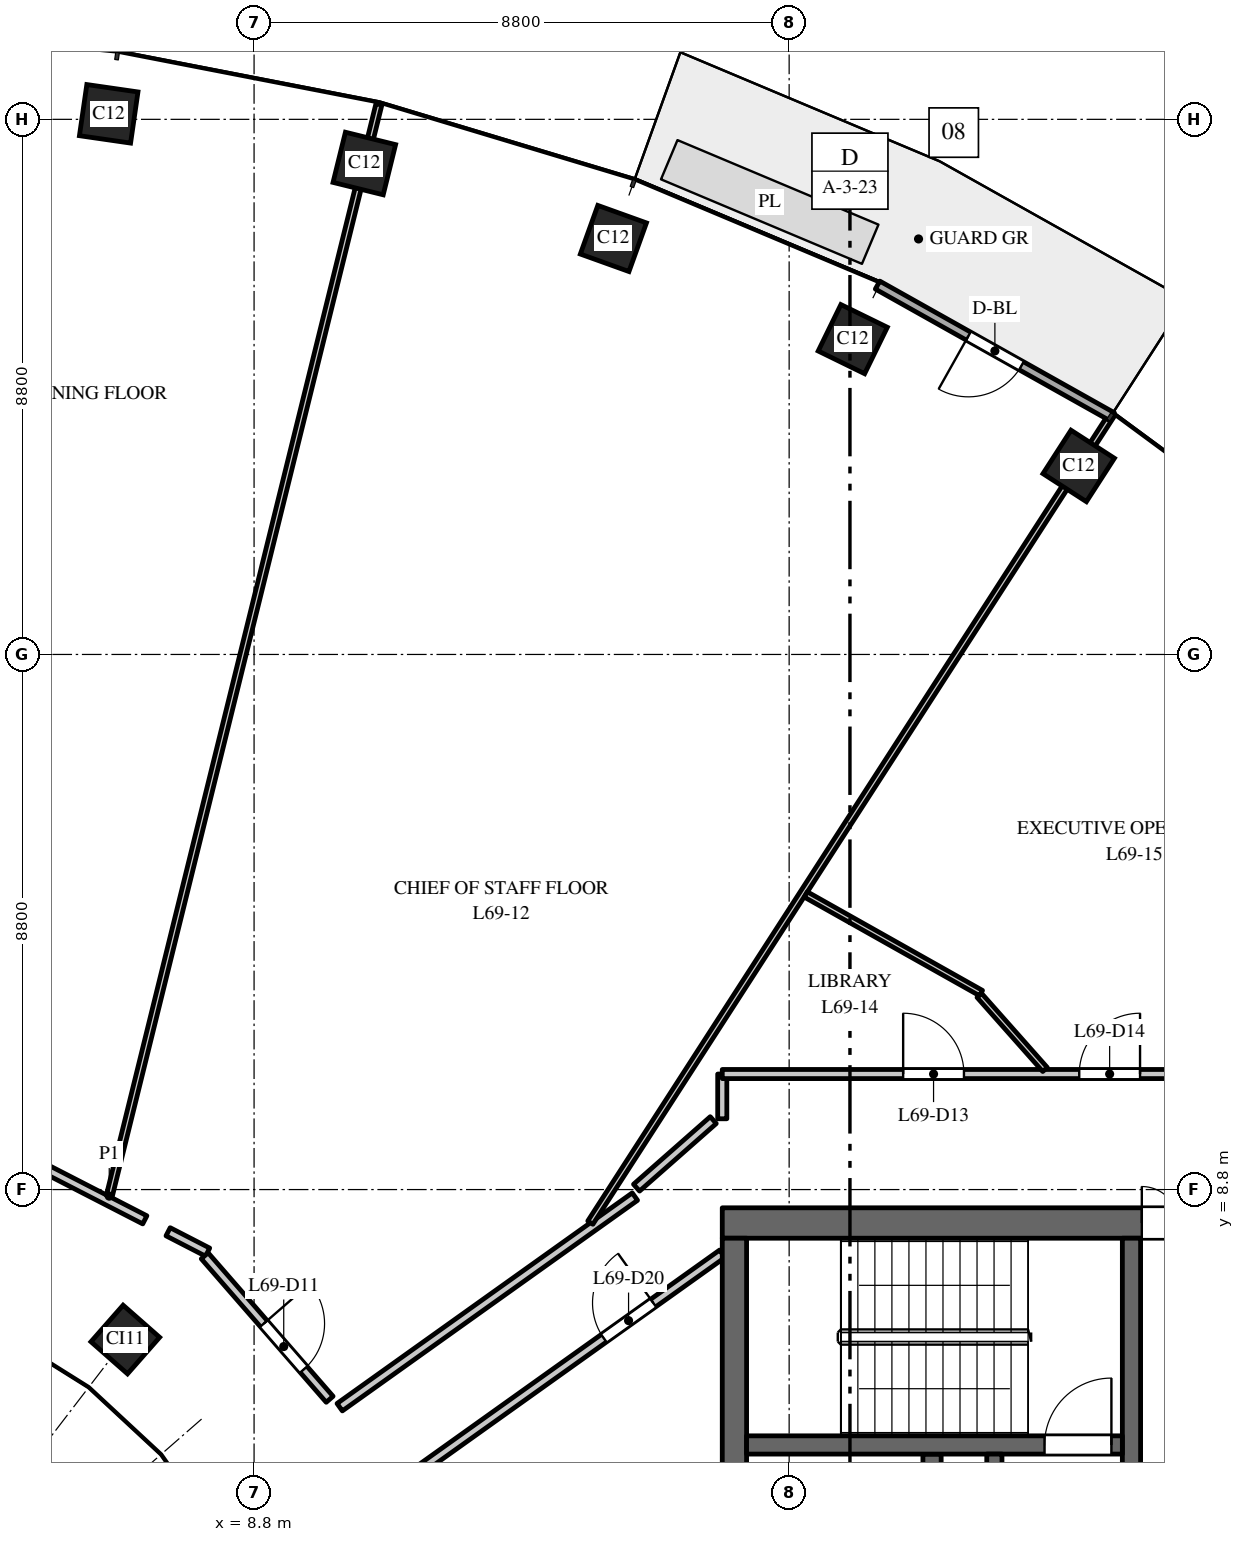
"""IFC4 building model, lengths in metres.
Left out: names, types, materials, properties, quantities, classifications, styles, units other than length and angle.
Written with IfcOpenShell. Run it as: python <this file> out.ifc"""

import sys

from ifc_helpers import new_model, si_unit, direction, frame, frame_2d, origin, origin_2d, place, context, subcontext, project, spatial, rectangle, extrude, element, fill, save


model = new_model("IFC4")
c1 = context("Model", 3, precision=1e-05, world=origin(), true_north=direction((0.0, 1.0)))
c2 = subcontext(c1, "Body", "Model", "MODEL_VIEW")
j1 = project(units=[si_unit("LENGTHUNIT", "METRE"), si_unit("PLANEANGLEUNIT", "RADIAN")], contexts=[c1])
p1 = place(None, origin())
s1 = spatial("IfcSite", under=j1, at=p1, CompositionType="ELEMENT")
p2 = place(p1, origin())
s2 = spatial("IfcBuilding", under=s1, at=p2, CompositionType="ELEMENT")
p3 = place(p2, frame((0.0, 0.0, 319.0)))
s3 = spatial("IfcBuildingStorey", under=s2, at=p3, CompositionType="ELEMENT", Elevation=319.0)
for number, where, z_axis, x_axis in (
    (1, (22.362, 20.7, 0.0), (0.0, 0.0, 1.0), (-0.84, 0.542, 0.0)),
    (2, (18.646, 22.785, 0.0), (0.0, 0.0, 1.0), (-0.898, 0.439, 0.0)),
    (3, (14.709, 24.441, 0.0), (0.0, 0.0, 1.0), (-0.941, 0.338, 0.0)),
    (4, (10.613, 25.674, 0.0), (0.0, 0.0, 1.0), (-0.971, 0.24, 0.0)),
    (5, (6.409, 26.491, 0.0), (0.0, 0.0, 1.0), (-0.99, 0.143, 0.0)),
):
    element("IfcColumn", number, at=place(p3, frame(where, z_axis=z_axis, x_axis=x_axis)), inside=s3, PredefinedType="COLUMN", context=c2, shape_type="SweptSolid", body=[
        extrude(rectangle(XDim=0.85, YDim=0.85, at=origin_2d()), origin(), (0.0, 0.0, 1.0), 4.0),
    ])
p4 = place(p3, frame((6.682, 6.334, 0.0), z_axis=(0.0, 0.0, 1.0), x_axis=(-0.75102249095, 0.660276622399, 0.0)))
e6 = element("IfcColumn", 6, at=p4, inside=s3, PredefinedType="COLUMN", context=c2, shape_type="SweptSolid", body=[
    extrude(rectangle(XDim=0.8, YDim=0.8, at=origin_2d()), origin(), (0.0, 0.0, 1.0), 4.0),
])
p5 = place(p3, frame((16.5, 8.25, 0.0), z_axis=(0.0, 0.0, 1.0), x_axis=(1.0, 0.0, 0.0)))
e7 = element("IfcWall", 7, at=p5, inside=s3, PredefinedType="SHEAR", context=c2, shape_type="SweptSolid", body=[
    extrude(rectangle(XDim=15.0, YDim=0.5, at=frame_2d((7.5, 0.0))), origin(), (0.0, 0.0, 1.0), 3.7),
])
p6 = place(p5, frame((6.9, 0.0, 0.0)))
e8 = element("IfcOpeningElement", 8, at=p6, cuts=e7, PredefinedType="OPENING", context=c2, shape_type="SweptSolid", body=[
    extrude(rectangle(XDim=1.2, YDim=2.1, at=frame_2d((0.6, 1.05))), frame((0.0, 0.26, 0.0), z_axis=(0.0, -1.0, 0.0), x_axis=(1.0, 0.0, 0.0)), (0.0, 0.0, 1.0), 0.52),
])
p7 = place(p5, frame((12.05, 0.0, 0.0)))
e9 = element("IfcOpeningElement", 9, at=p7, cuts=e7, PredefinedType="OPENING", context=c2, shape_type="SweptSolid", body=[
    extrude(rectangle(XDim=0.9, YDim=2.1, at=frame_2d((0.45, 1.05))), frame((0.0, 0.26, 0.0), z_axis=(0.0, -1.0, 0.0), x_axis=(1.0, 0.0, 0.0)), (0.0, 0.0, 1.0), 0.52),
])
p8 = place(p3, frame((19.95, -4.45, 0.0), z_axis=(0.0, 0.0, 1.0), x_axis=(0.0, 1.0, 0.0)))
e10 = element("IfcWall", 10, at=p8, inside=s3, PredefinedType="SHEAR", context=c2, shape_type="SweptSolid", body=[
    extrude(rectangle(XDim=8.9, YDim=0.3, at=frame_2d((4.45, 0.0))), origin(), (0.0, 0.0, 1.0), 3.7),
])
p9 = place(p8, frame((0.775, 0.0, 0.0)))
e11 = element("IfcOpeningElement", 11, at=p9, cuts=e10, PredefinedType="OPENING", context=c2, shape_type="SweptSolid", body=[
    extrude(rectangle(XDim=1.2, YDim=2.1, at=frame_2d((0.6, 1.05))), frame((0.0, 0.16, 0.0), z_axis=(0.0, -1.0, 0.0), x_axis=(1.0, 0.0, 0.0)), (0.0, 0.0, 1.0), 0.32),
])
p10 = place(p8, frame((6.0, 0.0, 0.0)))
e12 = element("IfcOpeningElement", 12, at=p10, cuts=e10, PredefinedType="OPENING", context=c2, shape_type="SweptSolid", body=[
    extrude(rectangle(XDim=0.9, YDim=2.1, at=frame_2d((0.45, 1.05))), frame((0.0, 0.16, 0.0), z_axis=(0.0, -1.0, 0.0), x_axis=(1.0, 0.0, 0.0)), (0.0, 0.0, 1.0), 0.32),
])
p11 = place(p3, frame((16.7, -8.0, 0.0), z_axis=(0.0, 0.0, 1.0), x_axis=(0.0, 1.0, 0.0)))
e13 = element("IfcWall", 13, at=p11, inside=s3, PredefinedType="SHEAR", context=c2, shape_type="SweptSolid", body=[
    extrude(rectangle(XDim=16.0, YDim=0.4, at=frame_2d((8.0, 0.0))), origin(), (0.0, 0.0, 1.0), 3.7),
])
p12 = place(p3, frame((23.23, 2.25, 0.0), z_axis=(0.0, 0.0, 1.0), x_axis=(0.0, 1.0, 0.0)))
e14 = element("IfcWall", 14, at=p12, inside=s3, PredefinedType="SHEAR", context=c2, shape_type="SweptSolid", body=[
    extrude(rectangle(XDim=5.75, YDim=0.3, at=frame_2d((2.875, 0.0))), origin(), (0.0, 0.0, 1.0), 3.7),
])
p13 = place(p12, frame((0.6, 0.0, 0.0)))
e15 = element("IfcOpeningElement", 15, at=p13, cuts=e14, PredefinedType="OPENING", context=c2, shape_type="SweptSolid", body=[
    extrude(rectangle(XDim=1.0, YDim=2.1, at=frame_2d((0.5, 1.05))), frame((0.0, 0.16, 0.0), z_axis=(0.0, -1.0, 0.0), x_axis=(1.0, 0.0, 0.0)), (0.0, 0.0, 1.0), 0.32),
])
p14 = place(p3, frame((16.9, 4.6, 0.0), z_axis=(0.0, 0.0, 1.0), x_axis=(1.0, 0.0, 0.0)))
e16 = element("IfcWall", 16, at=p14, inside=s3, PredefinedType="SHEAR", context=c2, shape_type="SweptSolid", body=[
    extrude(rectangle(XDim=6.18, YDim=0.3, at=frame_2d((3.09, 0.0))), origin(), (0.0, 0.0, 1.0), 3.7),
])
p15 = place(p14, frame((4.9, 0.0, 0.0)))
e17 = element("IfcOpeningElement", 17, at=p15, cuts=e16, PredefinedType="OPENING", context=c2, shape_type="SweptSolid", body=[
    extrude(rectangle(XDim=1.1, YDim=2.1, at=frame_2d((0.55, 1.05))), frame((0.0, 0.16, 0.0), z_axis=(0.0, -1.0, 0.0), x_axis=(1.0, 0.0, 0.0)), (0.0, 0.0, 1.0), 0.32),
])
p16 = place(p3, frame((20.975, 2.25, 0.0), z_axis=(0.0, 0.0, 1.0), x_axis=(0.0, 1.0, 0.0)))
e18 = element("IfcWall", 18, at=p16, inside=s3, PredefinedType="SHEAR", context=c2, shape_type="SweptSolid", body=[
    extrude(rectangle(XDim=2.2, YDim=0.25, at=frame_2d((1.1, 0.0))), origin(), (0.0, 0.0, 1.0), 3.7),
])
p17 = place(p3, frame((22.913, 21.509, 0.0), z_axis=(0.0, 0.0, 1.0), x_axis=(-0.872046572975, 0.489422899509, 0.0)))
e19 = element("IfcWall", 19, at=p17, inside=s3, PredefinedType="STANDARD", context=c2, shape_type="SweptSolid", body=[
    extrude(rectangle(XDim=4.426, YDim=0.15, at=frame_2d((2.213, 0.0))), origin(), (0.0, 0.0, 1.0), 3.7),
])
p18 = place(p17, frame((1.713, 0.0, 0.0)))
e20 = element("IfcOpeningElement", 20, at=p18, cuts=e19, PredefinedType="OPENING", context=c2, shape_type="SweptSolid", body=[
    extrude(rectangle(XDim=1.0, YDim=2.4, at=frame_2d((0.5, 1.2))), frame((0.0, 0.085, 0.0), z_axis=(0.0, -1.0, 0.0), x_axis=(1.0, 0.0, 0.0)), (0.0, 0.0, 1.0), 0.17),
])
p19 = place(p3, frame((4.276, 9.704, 0.0), z_axis=(0.0, 0.0, 1.0), x_axis=(0.889338682752, -0.45724906491, 0.0)))
e21 = element("IfcWall", 21, at=p19, inside=s3, PredefinedType="PARTITIONING", context=c2, shape_type="SweptSolid", body=[
    extrude(rectangle(XDim=3.066, YDim=0.15, at=frame_2d((1.533, 0.0))), origin(), (0.0, 0.0, 1.0), 2.85),
])
p20 = place(p3, frame((6.418, 8.692, 0.0), z_axis=(0.0, 0.0, 1.0), x_axis=(0.239813663249, 0.970818936218, 0.0)))
e22 = element("IfcWall", 22, at=p20, inside=s3, PredefinedType="PARTITIONING", context=c2, shape_type="SweptSolid", body=[
    extrude(rectangle(XDim=18.494, YDim=0.1, at=frame_2d((9.247, 0.0))), origin(), (0.0, 0.0, 1.0), 2.85),
])
p21 = place(p3, frame((7.386, 8.106, 0.0), z_axis=(0.0, 0.0, 1.0), x_axis=(0.888883911649, -0.458132504426, 0.0)))
e23 = element("IfcWall", 23, at=p21, inside=s3, PredefinedType="PARTITIONING", context=c2, shape_type="SweptSolid", body=[
    extrude(rectangle(XDim=0.731, YDim=0.15, at=frame_2d((0.366, 0.0))), origin(), (0.0, 0.0, 1.0), 3.7),
])
p22 = place(p3, frame((7.988, 7.711, 0.0), z_axis=(0.0, 0.0, 1.0), x_axis=(0.656702027819, -0.754150148616, 0.0)))
e24 = element("IfcWall", 24, at=p22, inside=s3, PredefinedType="PARTITIONING", context=c2, shape_type="SweptSolid", body=[
    extrude(rectangle(XDim=3.129, YDim=0.15, at=frame_2d((1.564, 0.0))), origin(), (0.0, 0.0, 1.0), 2.75),
])
p23 = place(p22, frame((1.479, 0.0, 0.0)))
e25 = element("IfcOpeningElement", 25, at=p23, cuts=e24, PredefinedType="OPENING", context=c2, shape_type="SweptSolid", body=[
    extrude(rectangle(XDim=1.0, YDim=2.1, at=frame_2d((0.5, 1.05))), frame((0.0, 0.085, 0.0), z_axis=(0.0, -1.0, 0.0), x_axis=(1.0, 0.0, 0.0)), (0.0, 0.0, 1.0), 0.17),
])
p24 = place(p3, frame((10.208, 5.221, 0.0), z_axis=(0.0, 0.0, 1.0), x_axis=(0.814106730479, 0.580715275663, 0.0)))
e26 = element("IfcWall", 26, at=p24, inside=s3, PredefinedType="PARTITIONING", context=c2, shape_type="SweptSolid", body=[
    extrude(rectangle(XDim=5.964, YDim=0.15, at=frame_2d((2.982, 0.0))), origin(), (0.0, 0.0, 1.0), 2.75),
])
p25 = place(p3, frame((10.97, 3.799, 0.0), z_axis=(0.0, 0.0, 1.0), x_axis=(0.814095150002, 0.580731510032, 0.0)))
e27 = element("IfcWall", 27, at=p25, inside=s3, PredefinedType="PARTITIONING", context=c2, shape_type="SweptSolid", body=[
    extrude(rectangle(XDim=6.793, YDim=0.15, at=frame_2d((3.396, 0.0))), origin(), (0.0, 0.0, 1.0), 3.7),
])
p26 = place(p25, frame((4.4, 0.0, 0.0)))
e28 = element("IfcOpeningElement", 28, at=p26, cuts=e27, PredefinedType="OPENING", context=c2, shape_type="SweptSolid", body=[
    extrude(rectangle(XDim=1.0, YDim=2.1, at=frame_2d((0.5, 1.05))), frame((0.0, 0.085, 0.0), z_axis=(0.0, -1.0, 0.0), x_axis=(1.0, 0.0, 0.0)), (0.0, 0.0, 1.0), 0.17),
])
p27 = place(p3, frame((14.33, 8.256, 0.0), z_axis=(0.0, 0.0, 1.0), x_axis=(0.542279133869, 0.840198393816, 0.0)))
e29 = element("IfcWall", 29, at=p27, inside=s3, PredefinedType="PARTITIONING", context=c2, shape_type="SweptSolid", body=[
    extrude(rectangle(XDim=15.813, YDim=0.1, at=frame_2d((7.906, 0.0))), origin(), (0.0, 0.0, 1.0), 3.7),
])
p28 = place(p3, frame((16.5, 9.964, 0.0), z_axis=(0.0, 0.0, 1.0), x_axis=(0.0, 1.0, 0.0)))
e30 = element("IfcWall", 30, at=p28, inside=s3, PredefinedType="PARTITIONING", context=c2, shape_type="SweptSolid", body=[
    extrude(rectangle(XDim=0.736, YDim=0.15, at=frame_2d((0.368, 0.0))), origin(), (0.0, 0.0, 1.0), 3.7),
])
p29 = place(p3, frame((16.5, 10.7, 0.0), z_axis=(0.0, 0.0, 1.0), x_axis=(1.0, 0.0, 0.0)))
e31 = element("IfcWall", 31, at=p29, inside=s3, PredefinedType="PARTITIONING", context=c2, shape_type="SweptSolid", body=[
    extrude(rectangle(XDim=15.0, YDim=0.15, at=frame_2d((7.5, 0.0))), origin(), (0.0, 0.0, 1.0), 2.75),
])
p30 = place(p29, frame((2.975, 0.0, 0.0)))
e32 = element("IfcOpeningElement", 32, at=p30, cuts=e31, PredefinedType="OPENING", context=c2, shape_type="SweptSolid", body=[
    extrude(rectangle(XDim=1.0, YDim=2.1, at=frame_2d((0.5, 1.05))), frame((0.0, 0.085, 0.0), z_axis=(0.0, -1.0, 0.0), x_axis=(1.0, 0.0, 0.0)), (0.0, 0.0, 1.0), 0.17),
])
p31 = place(p29, frame((5.871, 0.0, 0.0)))
e33 = element("IfcOpeningElement", 33, at=p31, cuts=e31, PredefinedType="OPENING", context=c2, shape_type="SweptSolid", body=[
    extrude(rectangle(XDim=1.0, YDim=2.1, at=frame_2d((0.5, 1.05))), frame((0.0, 0.085, 0.0), z_axis=(0.0, -1.0, 0.0), x_axis=(1.0, 0.0, 0.0)), (0.0, 0.0, 1.0), 0.17),
])
p32 = place(p3, frame((17.874, 13.653, 0.0), z_axis=(0.0, 0.0, 1.0), x_axis=(0.871459194926, -0.490468012799, 0.0)))
e34 = element("IfcWall", 34, at=p32, inside=s3, PredefinedType="PARTITIONING", context=c2, shape_type="SweptSolid", body=[
    extrude(rectangle(XDim=3.307, YDim=0.1, at=frame_2d((1.654, 0.0))), origin(), (0.0, 0.0, 1.0), 3.7),
])
p33 = place(p3, frame((20.727, 11.994, 0.0), z_axis=(0.0, 0.0, 1.0), x_axis=(0.663507744466, -0.748169414661, 0.0)))
e35 = element("IfcWall", 35, at=p33, inside=s3, PredefinedType="PARTITIONING", context=c2, shape_type="SweptSolid", body=[
    extrude(rectangle(XDim=1.629, YDim=0.1, at=frame_2d((0.815, 0.0))), origin(), (0.0, 0.0, 1.0), 2.75),
])
p34 = place(p3, frame((15.09, 8.831, 0.0), z_axis=(0.0, 0.0, 1.0), x_axis=(0.750621325629, 0.660732642989, 0.0)))
e36 = element("IfcWall", 36, at=p34, inside=s3, PredefinedType="PARTITIONING", context=c2, shape_type="SweptSolid", body=[
    extrude(rectangle(XDim=1.681, YDim=0.15, at=frame_2d((0.841, 0.0))), origin(), (0.0, 0.0, 1.0), 3.7),
])
p35 = place(p15, origin())
e37 = element("IfcDoor", 37, at=p35, inside=s3, OperationType="SINGLE_SWING_LEFT", PredefinedType="DOOR", context=c2, shape_type="SweptSolid", body=[
    extrude(rectangle(XDim=1.1, YDim=2.1, at=frame_2d((0.55, 1.05))), frame((0.0, 0.025, 0.0), z_axis=(0.0, -1.0, 0.0), x_axis=(1.0, 0.0, 0.0)), (0.0, 0.0, 1.0), 0.05),
])
fill(e17, e37)
p36 = place(p6, origin())
e38 = element("IfcDoor", 38, at=p36, inside=s3, OperationType="DOUBLE_DOOR_DOUBLE_SWING", PredefinedType="DOOR", context=c2, shape_type="SweptSolid", body=[
    extrude(rectangle(XDim=1.2, YDim=2.1, at=frame_2d((0.6, 1.05))), frame((0.0, 0.025, 0.0), z_axis=(0.0, -1.0, 0.0), x_axis=(1.0, 0.0, 0.0)), (0.0, 0.0, 1.0), 0.05),
])
fill(e8, e38)
p37 = place(p18, origin())
e39 = element("IfcDoor", 39, at=p37, inside=s3, OperationType="SINGLE_SWING_RIGHT", PredefinedType="DOOR", context=c2, shape_type="SweptSolid", body=[
    extrude(rectangle(XDim=1.0, YDim=2.4, at=frame_2d((0.5, 1.2))), frame((0.0, 0.025, 0.0), z_axis=(0.0, -1.0, 0.0), x_axis=(1.0, 0.0, 0.0)), (0.0, 0.0, 1.0), 0.05),
])
fill(e20, e39)
p38 = place(p23, origin())
e40 = element("IfcDoor", 40, at=p38, inside=s3, OperationType="SINGLE_SWING_LEFT", PredefinedType="DOOR", context=c2, shape_type="SweptSolid", body=[
    extrude(rectangle(XDim=1.0, YDim=2.1, at=frame_2d((0.5, 1.05))), frame((0.0, 0.025, 0.0), z_axis=(0.0, -1.0, 0.0), x_axis=(1.0, 0.0, 0.0)), (0.0, 0.0, 1.0), 0.05),
])
fill(e25, e40)
p39 = place(p30, origin())
e41 = element("IfcDoor", 41, at=p39, inside=s3, OperationType="SINGLE_SWING_LEFT", PredefinedType="DOOR", context=c2, shape_type="SweptSolid", body=[
    extrude(rectangle(XDim=1.0, YDim=2.1, at=frame_2d((0.5, 1.05))), frame((0.0, 0.025, 0.0), z_axis=(0.0, -1.0, 0.0), x_axis=(1.0, 0.0, 0.0)), (0.0, 0.0, 1.0), 0.05),
])
fill(e32, e41)
p40 = place(p31, origin())
e42 = element("IfcDoor", 42, at=p40, inside=s3, OperationType="SINGLE_SWING_RIGHT", PredefinedType="DOOR", context=c2, shape_type="SweptSolid", body=[
    extrude(rectangle(XDim=1.0, YDim=2.1, at=frame_2d((0.5, 1.05))), frame((0.0, 0.025, 0.0), z_axis=(0.0, -1.0, 0.0), x_axis=(1.0, 0.0, 0.0)), (0.0, 0.0, 1.0), 0.05),
])
fill(e33, e42)
p41 = place(p26, origin())
e43 = element("IfcDoor", 43, at=p41, inside=s3, OperationType="SINGLE_SWING_RIGHT", PredefinedType="DOOR", context=c2, shape_type="SweptSolid", body=[
    extrude(rectangle(XDim=1.0, YDim=2.1, at=frame_2d((0.5, 1.05))), frame((0.0, 0.025, 0.0), z_axis=(0.0, -1.0, 0.0), x_axis=(1.0, 0.0, 0.0)), (0.0, 0.0, 1.0), 0.05),
])
fill(e28, e43)
save(model, sys.argv[1])
